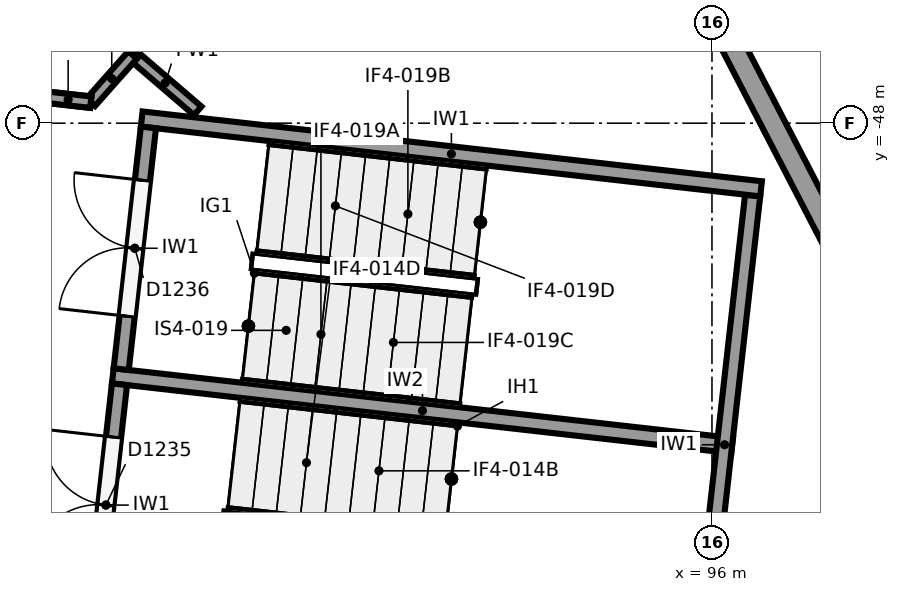
"""IFC4 building model, lengths in metres.
Left out: names, types, materials, properties, quantities, classifications, styles, units other than length and angle.
Written with IfcOpenShell. Run it as: python <this file> out.ifc"""

import sys

from ifc_helpers import new_model, si_unit, direction, frame, frame_2d, origin, place, context, subcontext, project, spatial, rectangle, extrude, element, fill, save


model = new_model("IFC4")
c1 = context("Model", 3, precision=1e-05, world=origin(), true_north=direction((0.0, 1.0)))
c2 = subcontext(c1, "Body", "Model", "MODEL_VIEW")
j1 = project(units=[si_unit("LENGTHUNIT", "METRE"), si_unit("PLANEANGLEUNIT", "RADIAN")], contexts=[c1])
p1 = place(None, origin())
s1 = spatial("IfcSite", under=j1, at=p1, CompositionType="ELEMENT")
p2 = place(p1, origin())
s2 = spatial("IfcBuilding", under=s1, at=p2, CompositionType="ELEMENT")
p3 = place(p2, frame((0.0, 0.0, 12.0)))
s3 = spatial("IfcBuildingStorey", under=s2, at=p3, CompositionType="ELEMENT", Elevation=12.0)
p4 = place(p3, frame((94.807, -44.149, 0.0), z_axis=(0.0, 0.0, 1.0), x_axis=(0.460021193284, -0.887907935391, 0.0)))
e1 = element("IfcWall", 1, at=p4, inside=s3, PredefinedType="SOLIDWALL", context=c2, shape_type="SweptSolid", body=[
    extrude(rectangle(XDim=13.075, YDim=0.3, at=frame_2d((6.538, 0.0))), origin(), (0.0, 0.0, 1.0), 4.35),
])
p5 = place(p3, frame((96.646, -48.863, 0.0), z_axis=(0.0, 0.0, 1.0), x_axis=(-0.993714104693, 0.111947658007, 0.0)))
e2 = element("IfcWall", 2, at=p5, inside=s3, PredefinedType="SHEAR", context=c2, shape_type="SweptSolid", body=[
    extrude(rectangle(XDim=8.2, YDim=0.2, at=frame_2d((4.1, 0.0))), origin(), (0.0, 0.0, 1.0), 5.65),
])
p6 = place(p3, frame((95.796, -55.51, 0.0), z_axis=(0.0, 0.0, 1.0), x_axis=(0.111970106426, 0.993711575492, 0.0)))
e3 = element("IfcWall", 3, at=p6, inside=s3, PredefinedType="SHEAR", context=c2, shape_type="SweptSolid", body=[
    extrude(rectangle(XDim=6.6, YDim=0.2, at=frame_2d((3.3, 0.0))), origin(), (0.0, 0.0, 1.0), 5.65),
])
p7 = place(p3, frame((96.265, -52.242, 0.0), z_axis=(0.0, 0.0, 1.0), x_axis=(-0.993713731549, 0.111950970206, 0.0)))
e4 = element("IfcWall", 4, at=p7, inside=s3, PredefinedType="SHEAR", context=c2, shape_type="SweptSolid", body=[
    extrude(rectangle(XDim=8.2, YDim=0.2, at=frame_2d((4.1, 0.0))), origin(), (0.0, 0.0, 1.0), 5.65),
])
p8 = place(p3, frame((87.846, -54.614, 0.0), z_axis=(0.0, 0.0, 1.0), x_axis=(0.112005735442, 0.993707560215, 0.0)))
e5 = element("IfcWall", 5, at=p8, inside=s3, PredefinedType="SHEAR", context=c2, shape_type="SweptSolid", body=[
    extrude(rectangle(XDim=3.2, YDim=0.2, at=frame_2d((1.6, 0.0))), origin(), (0.0, 0.0, 1.0), 5.65),
])
p9 = place(p8, frame((0.7, 0.0, 0.0)))
e6 = element("IfcOpeningElement", 6, at=p9, cuts=e5, PredefinedType="OPENING", context=c2, shape_type="SweptSolid", body=[
    extrude(rectangle(XDim=1.8, YDim=2.1, at=frame_2d((0.9, 1.05))), frame((0.0, 0.11, 0.0), z_axis=(0.0, -1.0, 0.0), x_axis=(1.0, 0.0, 0.0)), (0.0, 0.0, 1.0), 0.22),
])
p10 = place(p3, frame((88.227, -51.236, 0.0), z_axis=(0.0, 0.0, 1.0), x_axis=(0.111930393474, 0.993716049491, 0.0)))
e7 = element("IfcWall", 7, at=p10, inside=s3, PredefinedType="SHEAR", context=c2, shape_type="SweptSolid", body=[
    extrude(rectangle(XDim=3.2, YDim=0.2, at=frame_2d((1.6, 0.0))), origin(), (0.0, 0.0, 1.0), 5.65),
])
p11 = place(p10, frame((0.7, 0.0, 0.0)))
e8 = element("IfcOpeningElement", 8, at=p11, cuts=e7, PredefinedType="OPENING", context=c2, shape_type="SweptSolid", body=[
    extrude(rectangle(XDim=1.8, YDim=2.1, at=frame_2d((0.9, 1.05))), frame((0.0, 0.11, 0.0), z_axis=(0.0, -1.0, 0.0), x_axis=(1.0, 0.0, 0.0)), (0.0, 0.0, 1.0), 0.22),
])
p12 = place(p3, frame((89.234, -47.837, 0.0), z_axis=(0.0, 0.0, 1.0), x_axis=(-0.758950911089, 0.651147843855, 0.0)))
e9 = element("IfcWall", 9, at=p12, inside=s3, PredefinedType="PARTITIONING", context=c2, shape_type="SweptSolid", body=[
    extrude(rectangle(XDim=1.128, YDim=0.15, at=frame_2d((0.564, 0.0))), origin(), (0.0, 0.0, 1.0), 5.65),
])
p13 = place(p3, frame((88.378, -47.103, 0.0), z_axis=(0.0, 0.0, 1.0), x_axis=(-0.66330376879, -0.748350259109, 0.0)))
e10 = element("IfcWall", 10, at=p13, inside=s3, PredefinedType="PARTITIONING", context=c2, shape_type="SweptSolid", body=[
    extrude(rectangle(XDim=0.83, YDim=0.15, at=frame_2d((0.415, 0.0))), origin(), (0.0, 0.0, 1.0), 5.65),
])
p14 = place(p3, frame((87.827, -47.724, 0.0), z_axis=(0.0, 0.0, 1.0), x_axis=(-0.993708869306, 0.11199412066, 0.0)))
e11 = element("IfcWall", 11, at=p14, inside=s3, PredefinedType="PARTITIONING", context=c2, shape_type="SweptSolid", body=[
    extrude(rectangle(XDim=3.704, YDim=0.15, at=frame_2d((1.852, 0.0))), origin(), (0.0, 0.0, 1.0), 4.55),
])
p15 = place(p14, frame((0.65, 0.0, 0.0)))
e12 = element("IfcOpeningElement", 12, at=p15, cuts=e11, PredefinedType="OPENING", context=c2, shape_type="SweptSolid", body=[
    extrude(rectangle(XDim=1.8, YDim=2.1, at=frame_2d((0.9, 1.05))), frame((0.0, 0.085, 0.0), z_axis=(0.0, -1.0, 0.0), x_axis=(1.0, 0.0, 0.0)), (0.0, 0.0, 1.0), 0.17),
])
p16 = place(p3, frame((87.827, -47.724, 4.55), z_axis=(0.0, 0.0, 1.0), x_axis=(-0.993673547442, 0.112307083986, 0.0)))
e13 = element("IfcWall", 13, at=p16, inside=s3, PredefinedType="PARTITIONING", context=c2, shape_type="SweptSolid", body=[
    extrude(rectangle(XDim=0.6, YDim=0.15, at=frame_2d((0.3, 0.0))), origin(), (0.0, 0.0, 1.0), 1.1),
])
p17 = place(p9, origin())
e14 = element("IfcDoor", 14, at=p17, inside=s3, OperationType="DOUBLE_DOOR_SINGLE_SWING", PredefinedType="DOOR", context=c2, shape_type="SweptSolid", body=[
    extrude(rectangle(XDim=1.8, YDim=2.1, at=frame_2d((0.9, 1.05))), frame((0.0, 0.025, 0.0), z_axis=(0.0, -1.0, 0.0), x_axis=(1.0, 0.0, 0.0)), (0.0, 0.0, 1.0), 0.05),
])
fill(e6, e14)
p18 = place(p11, origin())
e15 = element("IfcDoor", 15, at=p18, inside=s3, OperationType="DOUBLE_DOOR_SINGLE_SWING", PredefinedType="DOOR", context=c2, shape_type="SweptSolid", body=[
    extrude(rectangle(XDim=1.8, YDim=2.1, at=frame_2d((0.9, 1.05))), frame((0.0, 0.025, 0.0), z_axis=(0.0, -1.0, 0.0), x_axis=(1.0, 0.0, 0.0)), (0.0, 0.0, 1.0), 0.05),
])
fill(e8, e15)
save(model, sys.argv[1])
